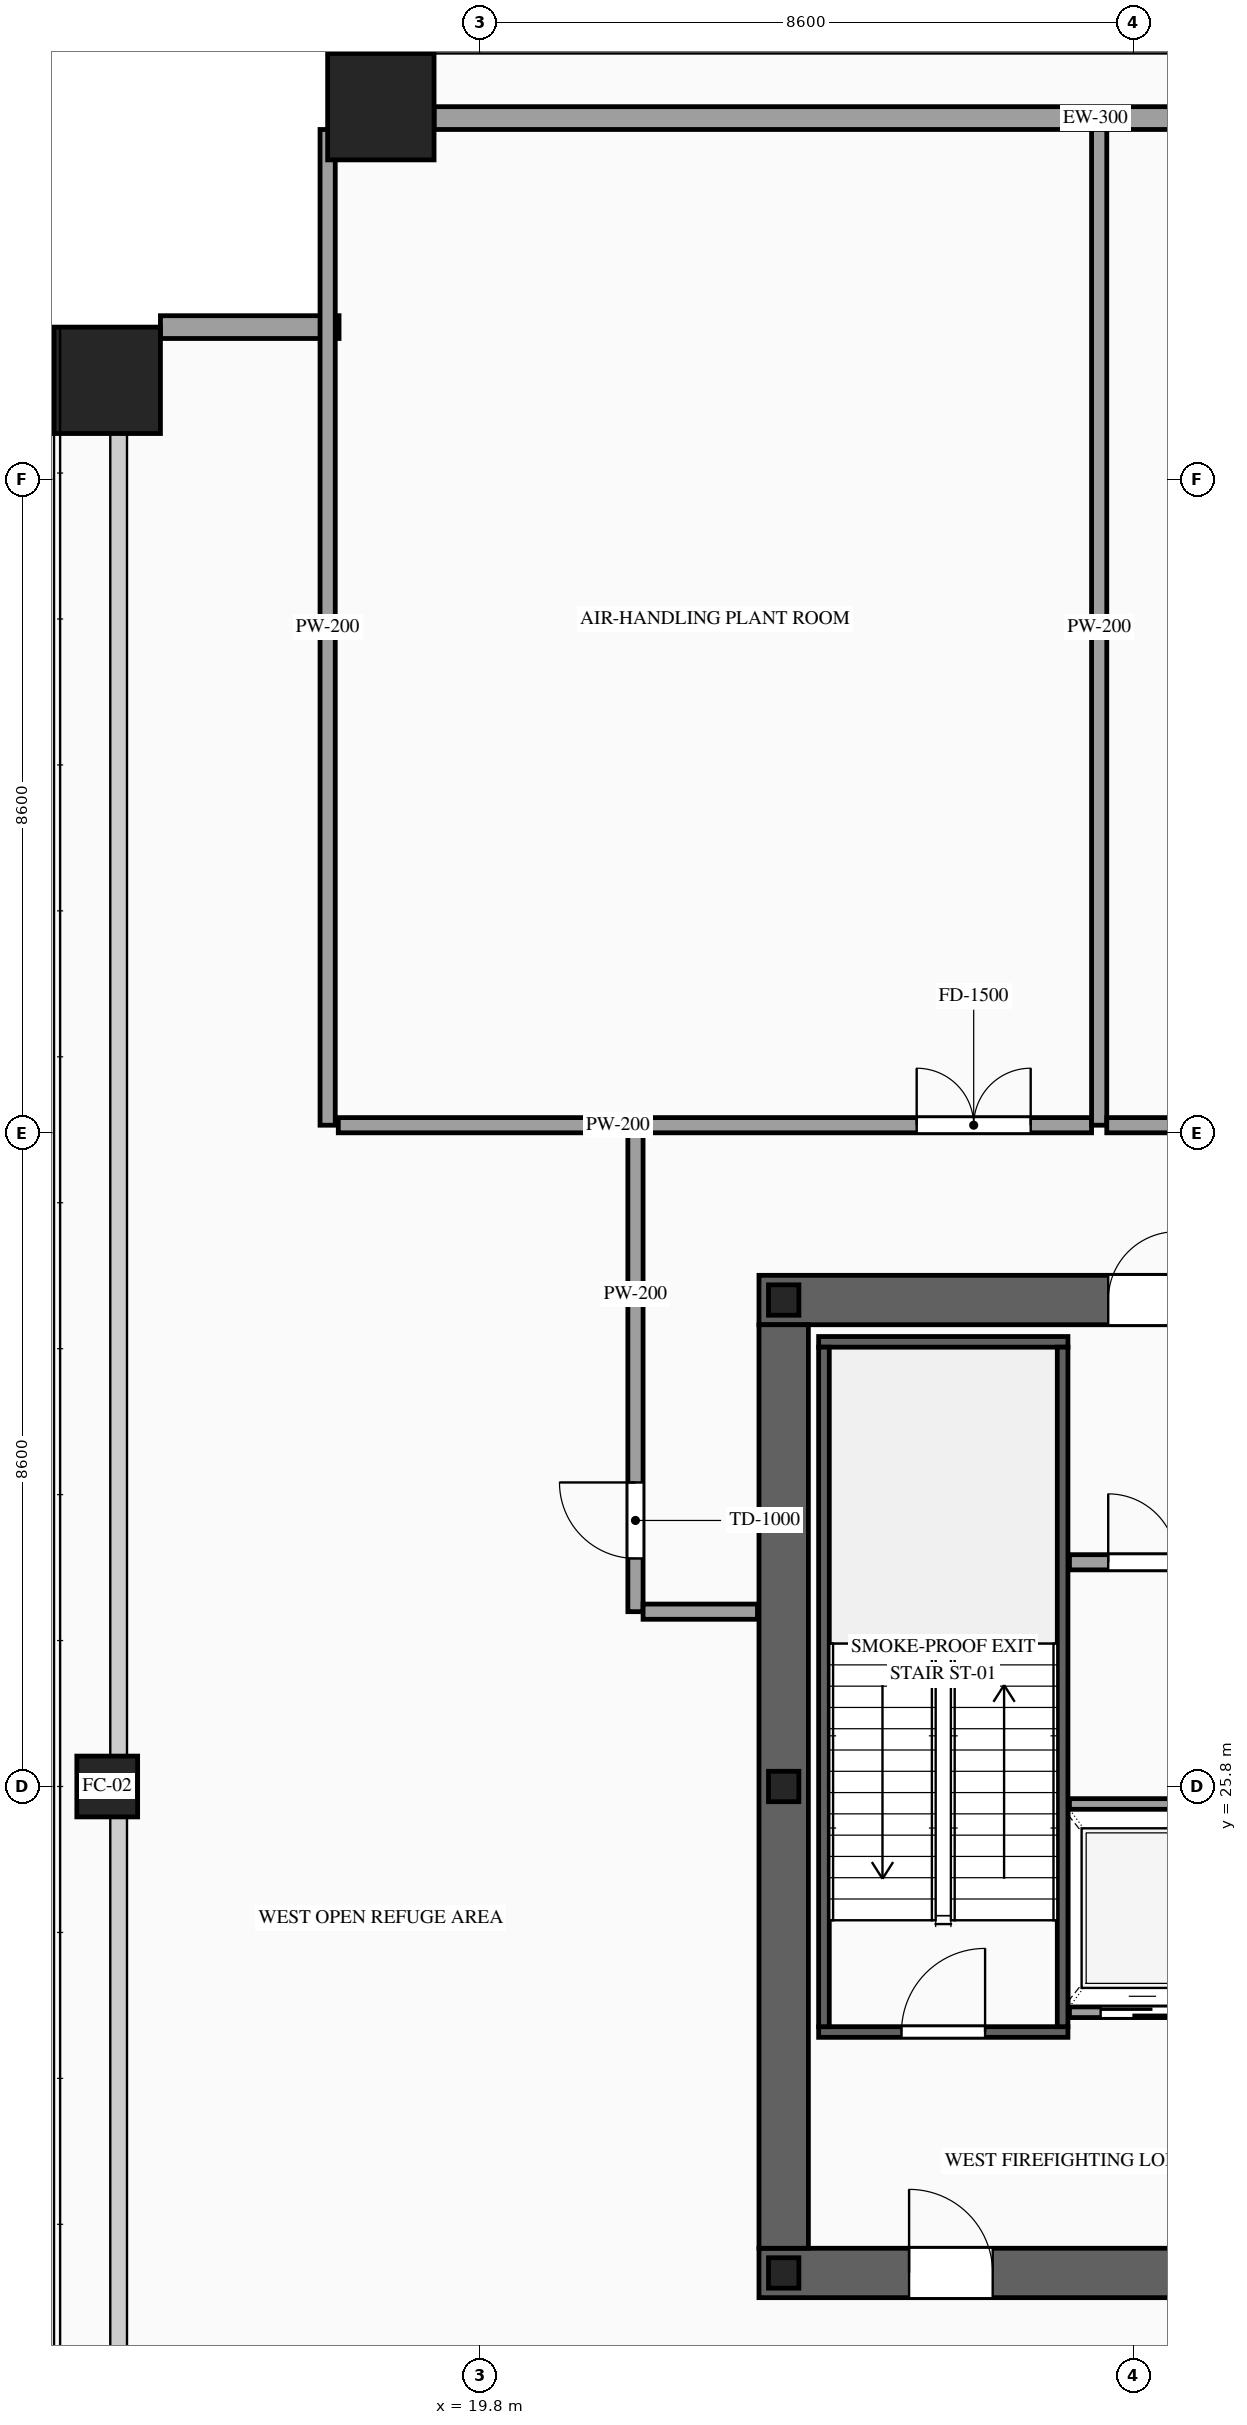
"""IFC4 building model, lengths in metres.
Left out: names, types, materials, properties, quantities, classifications, styles, units other than length and angle.
Written with IfcOpenShell. Run it as: python <this file> out.ifc"""

import sys

from ifc_helpers import new_model, si_unit, direction, frame, frame_2d, origin, origin_2d, place, context, subcontext, project, spatial, rectangle, hollow_rectangle, i_section, extrude, source, transform, mapped, element, fill, save


model = new_model("IFC4")
c1 = context("Model", 3, precision=1e-05, world=origin(), true_north=direction((0.0, 1.0)))
c2 = subcontext(c1, "Body", "Model", "MODEL_VIEW")
j1 = project(units=[si_unit("LENGTHUNIT", "METRE"), si_unit("PLANEANGLEUNIT", "RADIAN")], contexts=[c1])
p1 = place(None, origin())
s1 = spatial("IfcSite", under=j1, at=p1, CompositionType="ELEMENT")
p2 = place(p1, origin())
s2 = spatial("IfcBuilding", under=s1, at=p2, CompositionType="ELEMENT")
p3 = place(p2, frame((0.0, 0.0, 176.4)))
s3 = spatial("IfcBuildingStorey", under=s2, at=p3, CompositionType="ELEMENT", Elevation=176.4)
p4 = place(p3, frame((23.475, 19.4, 0.0), z_axis=(0.0, 0.0, 1.0), x_axis=(1.0, 0.0, 0.0)))
e1 = element("IfcWall", 1, at=p4, inside=s3, PredefinedType="SHEAR", context=c2, shape_type="SweptSolid", body=[
    extrude(rectangle(XDim=27.05, YDim=0.65, at=frame_2d((13.525, 0.0))), origin(), (0.0, 0.0, 1.0), 4.6),
])
p5 = place(p4, frame((1.975, 0.0, 0.0)))
e2 = element("IfcOpeningElement", 2, at=p5, cuts=e1, PredefinedType="OPENING", context=c2, shape_type="SweptSolid", body=[
    extrude(rectangle(XDim=1.1, YDim=2.2, at=frame_2d((0.55, 1.1))), frame((0.0, 0.34, 0.0), z_axis=(0.0, -1.0, 0.0), x_axis=(1.0, 0.0, 0.0)), (0.0, 0.0, 1.0), 0.68),
])
p6 = place(p4, frame((9.875, 0.0, 0.0)))
e3 = element("IfcOpeningElement", 3, at=p6, cuts=e1, PredefinedType="OPENING", context=c2, shape_type="SweptSolid", body=[
    extrude(rectangle(XDim=1.1, YDim=2.2, at=frame_2d((0.55, 1.1))), frame((0.0, 0.34, 0.0), z_axis=(0.0, -1.0, 0.0), x_axis=(1.0, 0.0, 0.0)), (0.0, 0.0, 1.0), 0.68),
])
p7 = place(p4, frame((23.075, 0.0, 0.0)))
e4 = element("IfcOpeningElement", 4, at=p7, cuts=e1, PredefinedType="OPENING", context=c2, shape_type="SweptSolid", body=[
    extrude(rectangle(XDim=1.1, YDim=2.2, at=frame_2d((0.55, 1.1))), frame((0.0, 0.34, 0.0), z_axis=(0.0, -1.0, 0.0), x_axis=(1.0, 0.0, 0.0)), (0.0, 0.0, 1.0), 0.68),
])
p8 = place(p4, frame((19.695, 0.0, 0.0)))
e5 = element("IfcOpeningElement", 5, at=p8, cuts=e1, PredefinedType="OPENING", context=c2, shape_type="SweptSolid", body=[
    extrude(rectangle(XDim=0.9, YDim=2.15, at=frame_2d((0.45, 1.075))), frame((0.0, 0.34, 0.0), z_axis=(0.0, -1.0, 0.0), x_axis=(1.0, 0.0, 0.0)), (0.0, 0.0, 1.0), 0.68),
])
p9 = place(p3, frame((23.475, 32.2, 0.0), z_axis=(0.0, 0.0, 1.0), x_axis=(1.0, 0.0, 0.0)))
e6 = element("IfcWall", 6, at=p9, inside=s3, PredefinedType="SHEAR", context=c2, shape_type="SweptSolid", body=[
    extrude(rectangle(XDim=27.05, YDim=0.65, at=frame_2d((13.525, 0.0))), origin(), (0.0, 0.0, 1.0), 4.6),
])
p10 = place(p9, frame((4.595, 0.0, 0.0)))
e7 = element("IfcOpeningElement", 7, at=p10, cuts=e6, PredefinedType="OPENING", context=c2, shape_type="SweptSolid", body=[
    extrude(rectangle(XDim=0.9, YDim=2.15, at=frame_2d((0.45, 1.075))), frame((0.0, 0.34, 0.0), z_axis=(0.0, -1.0, 0.0), x_axis=(1.0, 0.0, 0.0)), (0.0, 0.0, 1.0), 0.68),
])
p11 = place(p9, frame((9.875, 0.0, 0.0)))
e8 = element("IfcOpeningElement", 8, at=p11, cuts=e6, PredefinedType="OPENING", context=c2, shape_type="SweptSolid", body=[
    extrude(rectangle(XDim=1.1, YDim=2.2, at=frame_2d((0.55, 1.1))), frame((0.0, 0.34, 0.0), z_axis=(0.0, -1.0, 0.0), x_axis=(1.0, 0.0, 0.0)), (0.0, 0.0, 1.0), 0.68),
])
p12 = place(p9, frame((15.725, 0.0, 0.0)))
e9 = element("IfcOpeningElement", 9, at=p12, cuts=e6, PredefinedType="OPENING", context=c2, shape_type="SweptSolid", body=[
    extrude(rectangle(XDim=1.1, YDim=2.2, at=frame_2d((0.55, 1.1))), frame((0.0, 0.34, 0.0), z_axis=(0.0, -1.0, 0.0), x_axis=(1.0, 0.0, 0.0)), (0.0, 0.0, 1.0), 0.68),
])
p13 = place(p9, frame((18.925, 0.0, 0.0)))
e10 = element("IfcOpeningElement", 10, at=p13, cuts=e6, PredefinedType="OPENING", context=c2, shape_type="SweptSolid", body=[
    extrude(rectangle(XDim=0.9, YDim=2.15, at=frame_2d((0.45, 1.075))), frame((0.0, 0.34, 0.0), z_axis=(0.0, -1.0, 0.0), x_axis=(1.0, 0.0, 0.0)), (0.0, 0.0, 1.0), 0.68),
])
m1 = source(origin(), c2, "Body", "SweptSolid", [
    extrude(rectangle(XDim=12.15, YDim=0.65, at=frame_2d((6.075, 0.0))), origin(), (0.0, 0.0, 1.0), 4.6),
])
p14 = place(p3, frame((23.8, 19.725, 0.0), z_axis=(0.0, 0.0, 1.0), x_axis=(0.0, 1.0, 0.0)))
e11 = element("IfcWall", 11, at=p14, inside=s3, PredefinedType="SHEAR", context=c2, shape_type="MappedRepresentation", body=[
    mapped(m1, transform((0.0, 0.0, 0.0), scale=1.0)),
])
m2 = source(origin(), c2, "Body", "SweptSolid", [
    extrude(i_section(OverallWidth=0.4, OverallDepth=0.4, WebThickness=0.013, FlangeThickness=0.021, at=origin_2d()), origin(), (0.0, 0.0, 1.0), 4.6),
])
for number, where, z_axis, x_axis in (
    (12, (23.8, 19.4, 0.0), (0.0, 0.0, 1.0), (1.0, 0.0, 0.0)),
    (13, (23.8, 25.8, 0.0), (0.0, 0.0, 1.0), (1.0, 0.0, 0.0)),
    (14, (23.8, 32.2, 0.0), (0.0, 0.0, 1.0), (1.0, 0.0, 0.0)),
):
    element("IfcColumn", number, at=place(p3, frame(where, z_axis=z_axis, x_axis=x_axis)), inside=s3, PredefinedType="COLUMN", context=c2, shape_type="MappedRepresentation", body=[
        mapped(m2, transform((0.0, 0.0, 0.0), scale=1.0)),
    ])
m3 = source(origin(), c2, "Body", "SweptSolid", [
    extrude(hollow_rectangle(XDim=1.4, YDim=1.4, WallThickness=0.06, at=origin_2d()), origin(), (0.0, 0.0, 1.0), 4.6),
])
p15 = place(p3, frame((18.5, 47.9, 0.0), z_axis=(0.0, 0.0, 1.0), x_axis=(1.0, 0.0, 0.0)))
e15 = element("IfcColumn", 15, at=p15, inside=s3, PredefinedType="COLUMN", context=c2, shape_type="MappedRepresentation", body=[
    mapped(m3, transform((0.0, 0.0, 0.0), scale=1.0)),
])
m4 = source(origin(), c2, "Body", "SweptSolid", [
    extrude(hollow_rectangle(XDim=0.8, YDim=0.8, WallThickness=0.036, at=origin_2d()), origin(), (0.0, 0.0, 1.0), 4.6),
])
p16 = place(p3, frame((14.9, 25.8, 0.0), z_axis=(0.0, 0.0, 1.0), x_axis=(1.0, 0.0, 0.0)))
e16 = element("IfcColumn", 16, at=p16, inside=s3, PredefinedType="COLUMN", context=c2, shape_type="MappedRepresentation", body=[
    mapped(m4, transform((0.0, 0.0, 0.0), scale=1.0)),
])
p17 = place(p3, frame((14.9, 44.3, 0.0), z_axis=(0.0, 0.0, 1.0), x_axis=(1.0, 0.0, 0.0)))
e17 = element("IfcColumn", 17, at=p17, inside=s3, PredefinedType="COLUMN", context=c2, shape_type="MappedRepresentation", body=[
    mapped(m3, transform((0.0, 0.0, 0.0), scale=1.0)),
])
m5 = source(origin(), c2, "Body", "SweptSolid", [
    extrude(rectangle(XDim=2.35, YDim=0.3, at=frame_2d((1.175, 0.0))), origin(), (0.0, 0.0, 1.0), 4.38),
])
p18 = place(p3, frame((17.95, 45.0, 0.0), z_axis=(0.0, 0.0, 1.0), x_axis=(-1.0, 0.0, 0.0)))
e18 = element("IfcWall", 18, at=p18, inside=s3, PredefinedType="SOLIDWALL", context=c2, shape_type="MappedRepresentation", body=[
    mapped(m5, transform((0.0, 0.0, 0.0), scale=1.0)),
])
m6 = source(origin(), c2, "Body", "SweptSolid", [
    extrude(rectangle(XDim=17.4, YDim=0.3, at=frame_2d((8.7, 0.0))), origin(), (0.0, 0.0, 1.0), 3.935),
])
p19 = place(p3, frame((19.2, 47.75, 0.0), z_axis=(0.0, 0.0, 1.0), x_axis=(1.0, 0.0, 0.0)))
e19 = element("IfcWall", 19, at=p19, inside=s3, PredefinedType="SOLIDWALL", context=c2, shape_type="MappedRepresentation", body=[
    mapped(m6, transform((0.0, 0.0, 0.0), scale=1.0)),
])
p20 = place(p3, frame((27.56, 22.83, 0.0), z_axis=(0.0, 0.0, 1.0), x_axis=(1.0, 0.0, 0.0)))
e20 = element("IfcWall", 20, at=p20, inside=s3, PredefinedType="SOLIDWALL", context=c2, shape_type="SweptSolid", body=[
    extrude(rectangle(XDim=1.92, YDim=0.14, at=frame_2d((0.96, 0.0))), origin(), (0.0, 0.0, 1.0), 4.38),
])
p21 = place(p20, frame((0.41, 0.0, 0.0)))
e21 = element("IfcOpeningElement", 21, at=p21, cuts=e20, PredefinedType="OPENING", context=c2, shape_type="SweptSolid", body=[
    extrude(rectangle(XDim=1.1, YDim=2.2, at=frame_2d((0.55, 1.1))), frame((0.0, 0.085, 0.0), z_axis=(0.0, -1.0, 0.0), x_axis=(1.0, 0.0, 0.0)), (0.0, 0.0, 1.0), 0.17),
])
m7 = source(origin(), c2, "Body", "SweptSolid", [
    extrude(rectangle(XDim=1.92, YDim=0.14, at=frame_2d((0.96, 0.0))), origin(), (0.0, 0.0, 1.0), 4.38),
])
p22 = place(p3, frame((27.56, 25.57, 0.0), z_axis=(0.0, 0.0, 1.0), x_axis=(1.0, 0.0, 0.0)))
e22 = element("IfcWall", 22, at=p22, inside=s3, PredefinedType="SOLIDWALL", context=c2, shape_type="MappedRepresentation", body=[
    mapped(m7, transform((0.0, 0.0, 0.0), scale=1.0)),
])
p23 = place(p3, frame((24.26, 22.57, 0.0), z_axis=(0.0, 0.0, 1.0), x_axis=(1.0, 0.0, 0.0)))
e23 = element("IfcWall", 23, at=p23, inside=s3, PredefinedType="SOLIDWALL", context=c2, shape_type="SweptSolid", body=[
    extrude(rectangle(XDim=3.28, YDim=0.14, at=frame_2d((1.64, 0.0))), origin(), (0.0, 0.0, 1.0), 4.38),
])
p24 = place(p23, frame((1.09, 0.0, 0.0)))
e24 = element("IfcOpeningElement", 24, at=p24, cuts=e23, PredefinedType="OPENING", context=c2, shape_type="SweptSolid", body=[
    extrude(rectangle(XDim=1.1, YDim=2.2, at=frame_2d((0.55, 1.1))), frame((0.0, 0.085, 0.0), z_axis=(0.0, -1.0, 0.0), x_axis=(1.0, 0.0, 0.0)), (0.0, 0.0, 1.0), 0.17),
])
m8 = source(origin(), c2, "Body", "SweptSolid", [
    extrude(rectangle(XDim=3.28, YDim=0.14, at=frame_2d((1.64, 0.0))), origin(), (0.0, 0.0, 1.0), 4.38),
])
p25 = place(p3, frame((24.26, 31.65, 0.0), z_axis=(0.0, 0.0, 1.0), x_axis=(1.0, 0.0, 0.0)))
e25 = element("IfcWall", 25, at=p25, inside=s3, PredefinedType="SOLIDWALL", context=c2, shape_type="MappedRepresentation", body=[
    mapped(m8, transform((0.0, 0.0, 0.0), scale=1.0)),
])
m9 = source(origin(), c2, "Body", "SweptSolid", [
    extrude(rectangle(XDim=8.94, YDim=0.14, at=frame_2d((4.47, 0.0))), origin(), (0.0, 0.0, 1.0), 4.38),
])
for number, where, z_axis, x_axis in (
    (26, (24.33, 22.64, 0.0), (0.0, 0.0, 1.0), (0.0, 1.0, 0.0)),
    (27, (27.47, 22.64, 0.0), (0.0, 0.0, 1.0), (0.0, 1.0, 0.0)),
):
    element("IfcWall", number, at=place(p3, frame(where, z_axis=z_axis, x_axis=x_axis)), inside=s3, PredefinedType="SOLIDWALL", context=c2, shape_type="MappedRepresentation", body=[
        mapped(m9, transform((0.0, 0.0, 0.0), scale=1.0)),
    ])
p26 = place(p3, frame((27.56, 28.75, 0.0), z_axis=(0.0, 0.0, 1.0), x_axis=(1.0, 0.0, 0.0)))
e28 = element("IfcWall", 28, at=p26, inside=s3, PredefinedType="PARTITIONING", context=c2, shape_type="SweptSolid", body=[
    extrude(rectangle(XDim=1.92, YDim=0.2, at=frame_2d((0.96, 0.0))), origin(), (0.0, 0.0, 1.0), 4.38),
])
p27 = place(p26, frame((0.51, 0.0, 0.0)))
e29 = element("IfcOpeningElement", 29, at=p27, cuts=e28, PredefinedType="OPENING", context=c2, shape_type="SweptSolid", body=[
    extrude(rectangle(XDim=0.9, YDim=2.15, at=frame_2d((0.45, 1.075))), frame((0.0, 0.115, 0.0), z_axis=(0.0, -1.0, 0.0), x_axis=(1.0, 0.0, 0.0)), (0.0, 0.0, 1.0), 0.23),
])
m10 = source(origin(), c2, "Body", "SweptSolid", [
    extrude(rectangle(XDim=13.1, YDim=0.2, at=frame_2d((6.55, 0.0))), origin(), (0.0, 0.0, 1.0), 4.38),
])
p28 = place(p3, frame((17.8, 34.5, 0.0), z_axis=(0.0, 0.0, 1.0), x_axis=(0.0, 1.0, 0.0)))
e30 = element("IfcWall", 30, at=p28, inside=s3, PredefinedType="PARTITIONING", context=c2, shape_type="MappedRepresentation", body=[
    mapped(m10, transform((0.0, 0.0, 0.0), scale=1.0)),
])
p29 = place(p3, frame((21.85, 28.1, 0.0), z_axis=(0.0, 0.0, 1.0), x_axis=(0.0, 1.0, 0.0)))
e31 = element("IfcWall", 31, at=p29, inside=s3, PredefinedType="PARTITIONING", context=c2, shape_type="SweptSolid", body=[
    extrude(rectangle(XDim=6.4, YDim=0.2, at=frame_2d((3.2, 0.0))), origin(), (0.0, 0.0, 1.0), 4.38),
])
p30 = place(p29, frame((0.7, 0.0, 0.0)))
e32 = element("IfcOpeningElement", 32, at=p30, cuts=e31, PredefinedType="OPENING", context=c2, shape_type="SweptSolid", body=[
    extrude(rectangle(XDim=1.0, YDim=2.2, at=frame_2d((0.5, 1.1))), frame((0.0, 0.115, 0.0), z_axis=(0.0, -1.0, 0.0), x_axis=(1.0, 0.0, 0.0)), (0.0, 0.0, 1.0), 0.23),
])
m11 = source(origin(), c2, "Body", "SweptSolid", [
    extrude(rectangle(XDim=1.505, YDim=0.2, at=frame_2d((0.752, 0.0))), origin(), (0.0, 0.0, 1.0), 4.38),
])
p31 = place(p3, frame((21.95, 28.1, 0.0), z_axis=(0.0, 0.0, 1.0), x_axis=(1.0, 0.0, 0.0)))
e33 = element("IfcWall", 33, at=p31, inside=s3, PredefinedType="PARTITIONING", context=c2, shape_type="MappedRepresentation", body=[
    mapped(m11, transform((0.0, 0.0, 0.0), scale=1.0)),
])
p32 = place(p3, frame((17.94, 34.5, 0.0), z_axis=(0.0, 0.0, 1.0), x_axis=(1.0, 0.0, 0.0)))
e34 = element("IfcWall", 34, at=p32, inside=s3, PredefinedType="PARTITIONING", context=c2, shape_type="SweptSolid", body=[
    extrude(rectangle(XDim=9.911, YDim=0.2, at=frame_2d((4.956, 0.0))), origin(), (0.0, 0.0, 1.0), 4.38),
])
p33 = place(p32, frame((7.61, 0.0, 0.0)))
e35 = element("IfcOpeningElement", 35, at=p33, cuts=e34, PredefinedType="OPENING", context=c2, shape_type="SweptSolid", body=[
    extrude(rectangle(XDim=1.5, YDim=2.3, at=frame_2d((0.75, 1.15))), frame((0.0, 0.115, 0.0), z_axis=(0.0, -1.0, 0.0), x_axis=(1.0, 0.0, 0.0)), (0.0, 0.0, 1.0), 0.23),
])
p34 = place(p3, frame((27.951, 34.5, 0.0), z_axis=(0.0, 0.0, 1.0), x_axis=(0.0, 1.0, 0.0)))
e36 = element("IfcWall", 36, at=p34, inside=s3, PredefinedType="PARTITIONING", context=c2, shape_type="MappedRepresentation", body=[
    mapped(m10, transform((0.0, 0.0, 0.0), scale=1.0)),
])
p35 = place(p3, frame((28.051, 34.5, 0.0), z_axis=(0.0, 0.0, 1.0), x_axis=(1.0, 0.0, 0.0)))
e37 = element("IfcWall", 37, at=p35, inside=s3, PredefinedType="PARTITIONING", context=c2, shape_type="SweptSolid", body=[
    extrude(rectangle(XDim=6.2, YDim=0.2, at=frame_2d((3.1, 0.0))), origin(), (0.0, 0.0, 1.0), 4.38),
])
p36 = place(p35, frame((2.35, 0.0, 0.0)))
e38 = element("IfcOpeningElement", 38, at=p36, cuts=e37, PredefinedType="OPENING", context=c2, shape_type="SweptSolid", body=[
    extrude(rectangle(XDim=1.5, YDim=2.3, at=frame_2d((0.75, 1.15))), frame((0.0, 0.115, 0.0), z_axis=(0.0, -1.0, 0.0), x_axis=(1.0, 0.0, 0.0)), (0.0, 0.0, 1.0), 0.23),
])
m12 = source(origin(), c2, "Body", "SweptSolid", [
    extrude(rectangle(XDim=1.1, YDim=2.2, at=frame_2d((0.55, 1.1))), frame((0.0, 0.025, 0.0), z_axis=(0.0, -1.0, 0.0), x_axis=(1.0, 0.0, 0.0)), (0.0, 0.0, 1.0), 0.05),
])
p37 = place(p21, origin())
e39 = element("IfcDoor", 39, at=p37, inside=s3, OperationType="SLIDING_TO_LEFT", PredefinedType="DOOR", context=c2, shape_type="MappedRepresentation", body=[
    mapped(m12, transform((0.0, 0.0, 0.0), scale=1.0)),
])
fill(e21, e39)
m13 = source(origin(), c2, "Body", "SweptSolid", [
    extrude(rectangle(XDim=1.1, YDim=2.2, at=frame_2d((0.55, 1.1))), frame((0.0, 0.025, 0.0), z_axis=(0.0, -1.0, 0.0), x_axis=(1.0, 0.0, 0.0)), (0.0, 0.0, 1.0), 0.05),
])
p38 = place(p24, origin())
e40 = element("IfcDoor", 40, at=p38, inside=s3, OperationType="SINGLE_SWING_RIGHT", PredefinedType="DOOR", context=c2, shape_type="MappedRepresentation", body=[
    mapped(m13, transform((0.0, 0.0, 0.0), scale=1.0)),
])
fill(e24, e40)
p39 = place(p5, origin())
e41 = element("IfcDoor", 41, at=p39, inside=s3, OperationType="SINGLE_SWING_LEFT", PredefinedType="DOOR", context=c2, shape_type="MappedRepresentation", body=[
    mapped(m13, transform((0.0, 0.0, 0.0), scale=1.0)),
])
fill(e2, e41)
m14 = source(origin(), c2, "Body", "SweptSolid", [
    extrude(rectangle(XDim=0.9, YDim=2.15, at=frame_2d((0.45, 1.075))), frame((0.0, 0.025, 0.0), z_axis=(0.0, -1.0, 0.0), x_axis=(1.0, 0.0, 0.0)), (0.0, 0.0, 1.0), 0.05),
])
p40 = place(p10, origin())
e42 = element("IfcDoor", 42, at=p40, inside=s3, OperationType="SINGLE_SWING_RIGHT", PredefinedType="DOOR", context=c2, shape_type="MappedRepresentation", body=[
    mapped(m14, transform((0.0, 0.0, 0.0), scale=1.0)),
])
fill(e7, e42)
p41 = place(p27, origin())
e43 = element("IfcDoor", 43, at=p41, inside=s3, OperationType="SINGLE_SWING_LEFT", PredefinedType="DOOR", context=c2, shape_type="MappedRepresentation", body=[
    mapped(m14, transform((0.0, 0.0, 0.0), scale=1.0)),
])
fill(e29, e43)
m15 = source(origin(), c2, "Body", "SweptSolid", [
    extrude(rectangle(XDim=1.0, YDim=2.2, at=frame_2d((0.5, 1.1))), frame((0.0, 0.025, 0.0), z_axis=(0.0, -1.0, 0.0), x_axis=(1.0, 0.0, 0.0)), (0.0, 0.0, 1.0), 0.05),
])
p42 = place(p30, origin())
e44 = element("IfcDoor", 44, at=p42, inside=s3, OperationType="SINGLE_SWING_RIGHT", PredefinedType="DOOR", context=c2, shape_type="MappedRepresentation", body=[
    mapped(m15, transform((0.0, 0.0, 0.0), scale=1.0)),
])
fill(e32, e44)
m16 = source(origin(), c2, "Body", "SweptSolid", [
    extrude(rectangle(XDim=1.5, YDim=2.3, at=frame_2d((0.75, 1.15))), frame((0.0, 0.025, 0.0), z_axis=(0.0, -1.0, 0.0), x_axis=(1.0, 0.0, 0.0)), (0.0, 0.0, 1.0), 0.05),
])
p43 = place(p33, origin())
e45 = element("IfcDoor", 45, at=p43, inside=s3, OperationType="DOUBLE_DOOR_SINGLE_SWING", PredefinedType="DOOR", context=c2, shape_type="MappedRepresentation", body=[
    mapped(m16, transform((0.0, 0.0, 0.0), scale=1.0)),
])
fill(e35, e45)
save(model, sys.argv[1])
